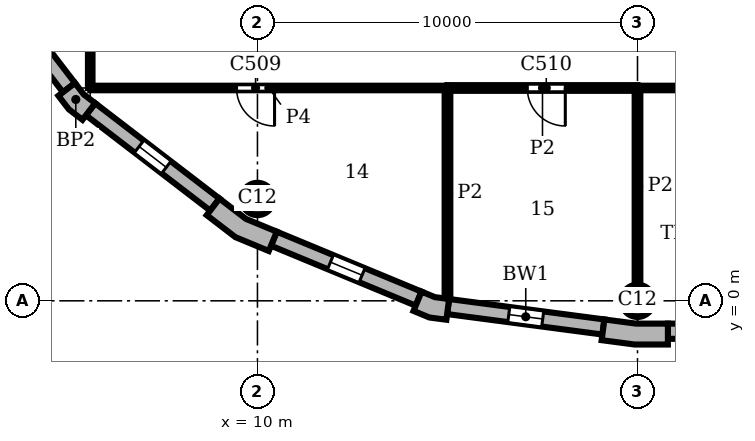
"""IFC4 building model, lengths in metres.
Left out: names, types, materials, properties, quantities, classifications, styles, units other than length and angle.
Written with IfcOpenShell. Run it as: python <this file> out.ifc"""

import sys

from ifc_helpers import new_model, si_unit, direction, frame, frame_2d, origin, origin_2d, place, context, subcontext, project, spatial, polyline, rectangle, circle, outline, extrude, element, fill, save


model = new_model("IFC4")
c1 = context("Model", 3, precision=1e-05, world=origin(), true_north=direction((0.0, 1.0)))
c2 = subcontext(c1, "Body", "Model", "MODEL_VIEW")
j1 = project(units=[si_unit("LENGTHUNIT", "METRE"), si_unit("PLANEANGLEUNIT", "RADIAN")], contexts=[c1])
p1 = place(None, origin())
s1 = spatial("IfcSite", under=j1, at=p1, CompositionType="ELEMENT")
p2 = place(p1, origin())
s2 = spatial("IfcBuilding", under=s1, at=p2, CompositionType="ELEMENT")
p3 = place(p2, frame((0.0, 0.0, 290.4)))
s3 = spatial("IfcBuildingStorey", under=s2, at=p3, CompositionType="ELEMENT", Elevation=290.4)
for number, where, z_axis, x_axis in (
    (1, (20.0, 0.0, 0.0), (0.0, 0.0, 1.0), (1.0, 0.0, 0.0)),
    (2, (10.0, 2.679, 0.0), (0.0, 0.0, 1.0), (1.0, 0.0, 0.0)),
):
    element("IfcColumn", number, at=place(p3, frame(where, z_axis=z_axis, x_axis=x_axis)), inside=s3, PredefinedType="COLUMN", context=c2, shape_type="SweptSolid", body=[
        extrude(circle(Radius=0.425, at=origin_2d()), origin(), (0.0, 0.0, 1.0), 3.9),
    ])
p4 = place(p3, origin())
e3 = element("IfcWall", 3, at=p4, inside=s3, PredefinedType="SOLIDWALL", context=c2, shape_type="SweptSolid", body=[
    extrude(outline(polyline([(19.076, -0.887), (19.057, -1.036), (19.925, -1.15), (20.8, -1.15), (20.8, -1.0), (20.8, -0.6), (19.961, -0.6), (19.128, -0.49), (19.076, -0.887)])), origin(), (0.0, 0.0, 1.0), 3.9),
])
e4 = element("IfcWall", 4, at=p4, inside=s3, PredefinedType="SOLIDWALL", context=c2, shape_type="SweptSolid", body=[
    extrude(outline(polyline([(4.882, 5.487), (4.763, 5.396), (5.038, 5.038), (5.396, 4.763), (5.487, 4.882), (5.731, 5.199), (5.43, 5.43), (5.199, 5.731), (4.882, 5.487)])), origin(), (0.0, 0.0, 1.0), 3.9),
])
e5 = element("IfcWall", 5, at=p4, inside=s3, PredefinedType="SOLIDWALL", context=c2, shape_type="SweptSolid", body=[
    extrude(outline(polyline([(8.757, 2.373), (8.665, 2.254), (9.42, 1.675), (10.299, 1.311), (10.356, 1.449), (10.51, 1.819), (9.698, 2.155), (9.0, 2.69), (8.757, 2.373)])), origin(), (0.0, 0.0, 1.0), 3.9),
])
e6 = element("IfcWall", 6, at=p4, inside=s3, PredefinedType="SOLIDWALL", context=c2, shape_type="SweptSolid", body=[
    extrude(outline(polyline([(14.164, -0.128), (14.106, -0.266), (14.523, -0.439), (14.971, -0.498), (14.99, -0.349), (15.043, 0.047), (14.667, 0.097), (14.317, 0.242), (14.164, -0.128)])), origin(), (0.0, 0.0, 1.0), 3.9),
])
p5 = place(p3, frame((20.8, -0.8, 0.0), z_axis=(0.0, 0.0, 1.0), x_axis=(1.0, 0.0, 0.0)))
e7 = element("IfcWall", 7, at=p5, inside=s3, PredefinedType="SOLIDWALL", context=c2, shape_type="SweptSolid", body=[
    extrude(rectangle(XDim=18.4, YDim=0.4, at=frame_2d((9.2, 0.0))), origin(), (0.0, 0.0, 1.0), 3.9),
])
p6 = place(p5, frame((3.75, 0.0, 0.9)))
e8 = element("IfcOpeningElement", 8, at=p6, cuts=e7, PredefinedType="OPENING", context=c2, shape_type="SweptSolid", body=[
    extrude(rectangle(XDim=0.9, YDim=2.35, at=frame_2d((0.45, 1.175))), frame((0.0, 0.21, 0.0), z_axis=(0.0, -1.0, 0.0), x_axis=(1.0, 0.0, 0.0)), (0.0, 0.0, 1.0), 0.42),
])
p7 = place(p5, frame((13.75, 0.0, 0.9)))
e9 = element("IfcOpeningElement", 9, at=p7, cuts=e7, PredefinedType="OPENING", context=c2, shape_type="SweptSolid", body=[
    extrude(rectangle(XDim=0.9, YDim=2.35, at=frame_2d((0.45, 1.175))), frame((0.0, 0.21, 0.0), z_axis=(0.0, -1.0, 0.0), x_axis=(1.0, 0.0, 0.0)), (0.0, 0.0, 1.0), 0.42),
])
p8 = place(p3, frame((2.532, 8.878, 0.0), z_axis=(0.0, 0.0, 1.0), x_axis=(0.608759824817, -0.793354571229, 0.0)))
e10 = element("IfcWall", 10, at=p8, inside=s3, PredefinedType="SOLIDWALL", context=c2, shape_type="SweptSolid", body=[
    extrude(rectangle(XDim=4.121, YDim=0.4, at=frame_2d((2.061, 0.0))), origin(), (0.0, 0.0, 1.0), 3.9),
])
p9 = place(p8, frame((1.611, 0.0, 0.9)))
e11 = element("IfcOpeningElement", 11, at=p9, cuts=e10, PredefinedType="OPENING", context=c2, shape_type="SweptSolid", body=[
    extrude(rectangle(XDim=0.9, YDim=2.35, at=frame_2d((0.45, 1.175))), frame((0.0, 0.21, 0.0), z_axis=(0.0, -1.0, 0.0), x_axis=(1.0, 0.0, 0.0)), (0.0, 0.0, 1.0), 0.42),
])
p10 = place(p3, frame((5.609, 5.041, 0.0), z_axis=(0.0, 0.0, 1.0), x_axis=(0.793354571229, -0.608759824817, 0.0)))
e12 = element("IfcWall", 12, at=p10, inside=s3, PredefinedType="SOLIDWALL", context=c2, shape_type="SweptSolid", body=[
    extrude(rectangle(XDim=4.121, YDim=0.4, at=frame_2d((2.061, 0.0))), origin(), (0.0, 0.0, 1.0), 3.9),
])
p11 = place(p10, frame((1.611, 0.0, 0.9)))
e13 = element("IfcOpeningElement", 13, at=p11, cuts=e12, PredefinedType="OPENING", context=c2, shape_type="SweptSolid", body=[
    extrude(rectangle(XDim=0.9, YDim=2.35, at=frame_2d((0.45, 1.175))), frame((0.0, 0.21, 0.0), z_axis=(0.0, -1.0, 0.0), x_axis=(1.0, 0.0, 0.0)), (0.0, 0.0, 1.0), 0.42),
])
p12 = place(p3, frame((10.433, 1.634, 0.0), z_axis=(0.0, 0.0, 1.0), x_axis=(0.923863744394, -0.382721546029, 0.0)))
e14 = element("IfcWall", 14, at=p12, inside=s3, PredefinedType="SOLIDWALL", context=c2, shape_type="SweptSolid", body=[
    extrude(rectangle(XDim=4.121, YDim=0.4, at=frame_2d((2.061, 0.0))), origin(), (0.0, 0.0, 1.0), 3.9),
])
p13 = place(p12, frame((1.611, 0.0, 0.9)))
e15 = element("IfcOpeningElement", 15, at=p13, cuts=e14, PredefinedType="OPENING", context=c2, shape_type="SweptSolid", body=[
    extrude(rectangle(XDim=0.9, YDim=2.35, at=frame_2d((0.45, 1.175))), frame((0.0, 0.21, 0.0), z_axis=(0.0, -1.0, 0.0), x_axis=(1.0, 0.0, 0.0)), (0.0, 0.0, 1.0), 0.42),
])
p14 = place(p3, frame((15.017, -0.151, 0.0), z_axis=(0.0, 0.0, 1.0), x_axis=(0.991446429508, -0.130514280502, 0.0)))
e16 = element("IfcWall", 16, at=p14, inside=s3, PredefinedType="SOLIDWALL", context=c2, shape_type="SweptSolid", body=[
    extrude(rectangle(XDim=4.121, YDim=0.4, at=frame_2d((2.061, 0.0))), origin(), (0.0, 0.0, 1.0), 3.9),
])
p15 = place(p14, frame((1.611, 0.0, 0.9)))
e17 = element("IfcOpeningElement", 17, at=p15, cuts=e16, PredefinedType="OPENING", context=c2, shape_type="SweptSolid", body=[
    extrude(rectangle(XDim=0.9, YDim=2.35, at=frame_2d((0.45, 1.175))), frame((0.0, 0.21, 0.0), z_axis=(0.0, -1.0, 0.0), x_axis=(1.0, 0.0, 0.0)), (0.0, 0.0, 1.0), 0.42),
])
p16 = place(p3, frame((15.0, 0.063, 0.0), z_axis=(0.0, 0.0, 1.0), x_axis=(0.0, 1.0, 0.0)))
e18 = element("IfcWall", 18, at=p16, inside=s3, PredefinedType="PARTITIONING", context=c2, shape_type="SweptSolid", body=[
    extrude(rectangle(XDim=5.537, YDim=0.15, at=frame_2d((2.769, 0.0))), origin(), (0.0, 0.0, 1.0), 3.58),
])
p17 = place(p3, frame((20.0, 0.425, 0.0), z_axis=(0.0, 0.0, 1.0), x_axis=(0.0, 1.0, 0.0)))
e19 = element("IfcWall", 19, at=p17, inside=s3, PredefinedType="PARTITIONING", context=c2, shape_type="SweptSolid", body=[
    extrude(rectangle(XDim=5.175, YDim=0.15, at=frame_2d((2.587, 0.0))), origin(), (0.0, 0.0, 1.0), 3.58),
])
p18 = place(p3, frame((15.0, 5.6, 0.0), z_axis=(0.0, 0.0, 1.0), x_axis=(1.0, 0.0, 0.0)))
e20 = element("IfcWall", 20, at=p18, inside=s3, PredefinedType="PARTITIONING", context=c2, shape_type="SweptSolid", body=[
    extrude(rectangle(XDim=5.0, YDim=0.15, at=frame_2d((2.5, 0.0))), origin(), (0.0, 0.0, 1.0), 3.58),
])
p19 = place(p18, frame((2.1, 0.0, 0.0)))
e21 = element("IfcOpeningElement", 21, at=p19, cuts=e20, PredefinedType="OPENING", context=c2, shape_type="SweptSolid", body=[
    extrude(rectangle(XDim=1.0, YDim=2.1, at=frame_2d((0.5, 1.05))), frame((0.0, 0.085, 0.0), z_axis=(0.0, -1.0, 0.0), x_axis=(1.0, 0.0, 0.0)), (0.0, 0.0, 1.0), 0.17),
])
p20 = place(p3, frame((5.6, 5.6, 0.0), z_axis=(0.0, 0.0, 1.0), x_axis=(0.0, 1.0, 0.0)))
e22 = element("IfcWall", 22, at=p20, inside=s3, PredefinedType="PARTITIONING", context=c2, shape_type="SweptSolid", body=[
    extrude(rectangle(XDim=9.4, YDim=0.12, at=frame_2d((4.7, 0.0))), origin(), (0.0, 0.0, 1.0), 3.58),
])
p21 = place(p20, frame((4.1, 0.0, 0.0)))
e23 = element("IfcOpeningElement", 23, at=p21, cuts=e22, PredefinedType="OPENING", context=c2, shape_type="SweptSolid", body=[
    extrude(rectangle(XDim=1.0, YDim=2.1, at=frame_2d((0.5, 1.05))), frame((0.0, 0.07, 0.0), z_axis=(0.0, -1.0, 0.0), x_axis=(1.0, 0.0, 0.0)), (0.0, 0.0, 1.0), 0.14),
])
p22 = place(p3, frame((5.6, 5.6, 0.0), z_axis=(0.0, 0.0, 1.0), x_axis=(1.0, 0.0, 0.0)))
e24 = element("IfcWall", 24, at=p22, inside=s3, PredefinedType="PARTITIONING", context=c2, shape_type="SweptSolid", body=[
    extrude(rectangle(XDim=9.4, YDim=0.12, at=frame_2d((4.7, 0.0))), origin(), (0.0, 0.0, 1.0), 3.58),
])
p23 = place(p22, frame((3.85, 0.0, 0.0)))
e25 = element("IfcOpeningElement", 25, at=p23, cuts=e24, PredefinedType="OPENING", context=c2, shape_type="SweptSolid", body=[
    extrude(rectangle(XDim=1.0, YDim=2.1, at=frame_2d((0.5, 1.05))), frame((0.0, 0.07, 0.0), z_axis=(0.0, -1.0, 0.0), x_axis=(1.0, 0.0, 0.0)), (0.0, 0.0, 1.0), 0.14),
])
p24 = place(p3, frame((20.0, 5.6, 0.0), z_axis=(0.0, 0.0, 1.0), x_axis=(1.0, 0.0, 0.0)))
e26 = element("IfcWall", 26, at=p24, inside=s3, PredefinedType="PARTITIONING", context=c2, shape_type="SweptSolid", body=[
    extrude(rectangle(XDim=11.0, YDim=0.12, at=frame_2d((5.5, 0.0))), origin(), (0.0, 0.0, 1.0), 3.58),
])
p25 = place(p11, origin())
e27 = element("IfcWindow", 27, at=p25, inside=s3, PartitioningType="SINGLE_PANEL", PredefinedType="WINDOW", context=c2, shape_type="SweptSolid", body=[
    extrude(rectangle(XDim=0.9, YDim=2.35, at=frame_2d((0.45, 1.175))), frame((0.0, 0.16, 0.0), z_axis=(0.0, -1.0, 0.0), x_axis=(1.0, 0.0, 0.0)), (0.0, 0.0, 1.0), 0.06),
])
fill(e13, e27)
p26 = place(p13, origin())
e28 = element("IfcWindow", 28, at=p26, inside=s3, PartitioningType="SINGLE_PANEL", PredefinedType="WINDOW", context=c2, shape_type="SweptSolid", body=[
    extrude(rectangle(XDim=0.9, YDim=2.35, at=frame_2d((0.45, 1.175))), frame((0.0, 0.16, 0.0), z_axis=(0.0, -1.0, 0.0), x_axis=(1.0, 0.0, 0.0)), (0.0, 0.0, 1.0), 0.06),
])
fill(e15, e28)
p27 = place(p15, origin())
e29 = element("IfcWindow", 29, at=p27, inside=s3, PartitioningType="SINGLE_PANEL", PredefinedType="WINDOW", context=c2, shape_type="SweptSolid", body=[
    extrude(rectangle(XDim=0.9, YDim=2.35, at=frame_2d((0.45, 1.175))), frame((0.0, 0.16, 0.0), z_axis=(0.0, -1.0, 0.0), x_axis=(1.0, 0.0, 0.0)), (0.0, 0.0, 1.0), 0.06),
])
fill(e17, e29)
p28 = place(p23, frame((1.0, 0.0, 0.0), z_axis=(0.0, 0.0, 1.0), x_axis=(-1.0, 0.0, 0.0)))
e30 = element("IfcDoor", 30, at=p28, inside=s3, OperationType="SINGLE_SWING_LEFT", PredefinedType="DOOR", context=c2, shape_type="SweptSolid", body=[
    extrude(rectangle(XDim=1.0, YDim=2.1, at=frame_2d((0.5, 1.05))), frame((0.0, 0.025, 0.0), z_axis=(0.0, -1.0, 0.0), x_axis=(1.0, 0.0, 0.0)), (0.0, 0.0, 1.0), 0.05),
])
fill(e25, e30)
p29 = place(p19, frame((1.0, 0.0, 0.0), z_axis=(0.0, 0.0, 1.0), x_axis=(-1.0, 0.0, 0.0)))
e31 = element("IfcDoor", 31, at=p29, inside=s3, OperationType="SINGLE_SWING_LEFT", PredefinedType="DOOR", context=c2, shape_type="SweptSolid", body=[
    extrude(rectangle(XDim=1.0, YDim=2.1, at=frame_2d((0.5, 1.05))), frame((0.0, 0.025, 0.0), z_axis=(0.0, -1.0, 0.0), x_axis=(1.0, 0.0, 0.0)), (0.0, 0.0, 1.0), 0.05),
])
fill(e21, e31)
save(model, sys.argv[1])
